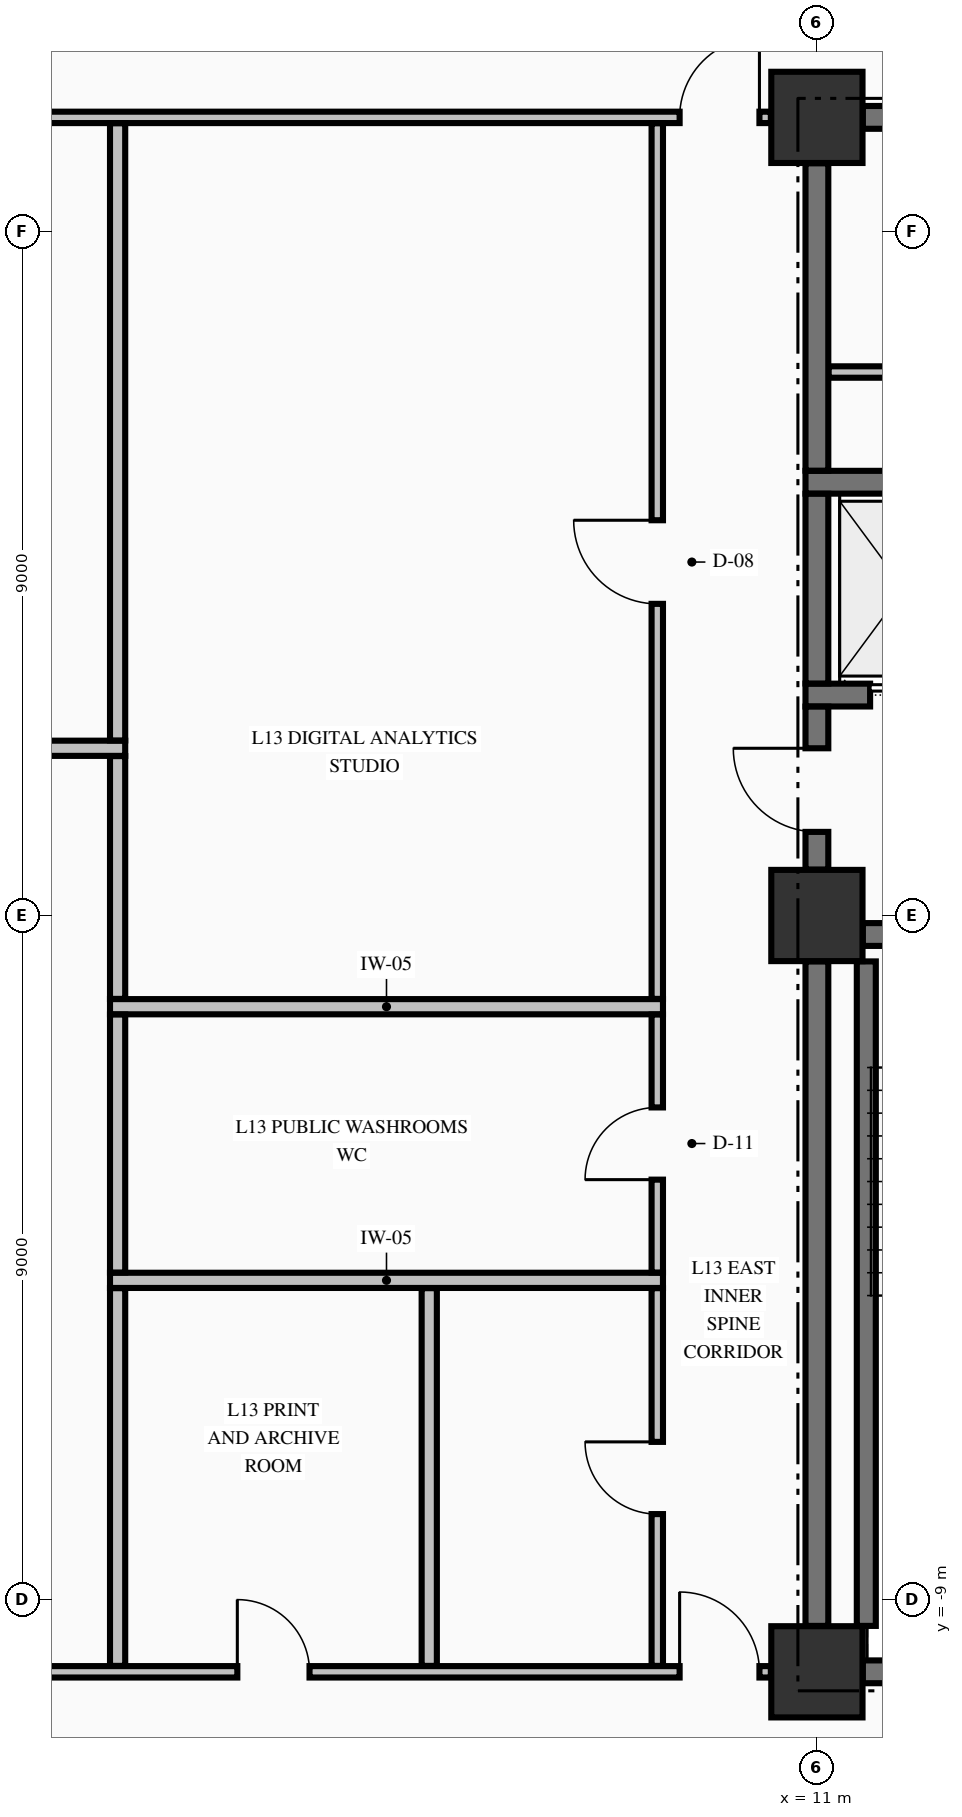
"""IFC4 building model, lengths in metres.
Left out: names, types, materials, properties, quantities, classifications, styles, units other than length and angle.
Written with IfcOpenShell. Run it as: python <this file> out.ifc"""

import sys

from ifc_helpers import new_model, si_unit, direction, frame, frame_2d, origin, origin_2d, place, context, subcontext, project, spatial, rectangle, extrude, element, fill, save


model = new_model("IFC4")
c1 = context("Model", 3, precision=1e-05, world=origin(), true_north=direction((0.0, 1.0)))
c2 = subcontext(c1, "Body", "Model", "MODEL_VIEW")
j1 = project(units=[si_unit("LENGTHUNIT", "METRE"), si_unit("PLANEANGLEUNIT", "RADIAN")], contexts=[c1])
p1 = place(None, origin())
s1 = spatial("IfcSite", under=j1, at=p1, CompositionType="ELEMENT")
p2 = place(p1, origin())
s2 = spatial("IfcBuilding", under=s1, at=p2, CompositionType="ELEMENT")
p3 = place(p2, frame((0.0, 0.0, 57.19)))
s3 = spatial("IfcBuildingStorey", under=s2, at=p3, CompositionType="ELEMENT", Elevation=57.19)
for number, where, z_axis, x_axis in (
    (1, (11.0, -9.95, -0.425), (0.0, 0.0, 1.0), (1.0, 0.0, 0.0)),
    (2, (11.0, 0.0, -0.425), (0.0, 0.0, 1.0), (1.0, 0.0, 0.0)),
    (3, (11.0, 10.5, -0.425), (0.0, 0.0, 1.0), (1.0, 0.0, 0.0)),
):
    element("IfcColumn", number, at=place(p3, frame(where, z_axis=z_axis, x_axis=x_axis)), inside=s3, PredefinedType="COLUMN", context=c2, shape_type="SweptSolid", body=[
        extrude(rectangle(XDim=1.2, YDim=1.2, at=origin_2d()), origin(), (0.0, 0.0, 1.0), 3.695),
    ])
p4 = place(p3, frame((11.604, -9.95, 0.0), z_axis=(0.0, 0.0, 1.0), x_axis=(1.0, 0.0, 0.0)))
e4 = element("IfcWall", 4, at=p4, inside=s3, PredefinedType="SHEAR", context=c2, shape_type="SweptSolid", body=[
    extrude(rectangle(XDim=3.096, YDim=0.3, at=frame_2d((1.548, 0.0))), origin(), (0.0, 0.0, 1.0), 3.27),
])
p5 = place(p3, frame((11.604, -0.25, 0.0), z_axis=(0.0, 0.0, 1.0), x_axis=(1.0, 0.0, 0.0)))
e5 = element("IfcWall", 5, at=p5, inside=s3, PredefinedType="SHEAR", context=c2, shape_type="SweptSolid", body=[
    extrude(rectangle(XDim=3.271, YDim=0.3, at=frame_2d((1.635, 0.0))), origin(), (0.0, 0.0, 1.0), 3.27),
])
p6 = place(p5, frame((0.996, 0.0, 0.0)))
e6 = element("IfcOpeningElement", 6, at=p6, cuts=e5, PredefinedType="OPENING", context=c2, shape_type="SweptSolid", body=[
    extrude(rectangle(XDim=1.1, YDim=2.15, at=frame_2d((0.55, 1.075))), frame((0.0, 0.16, 0.0), z_axis=(0.0, -1.0, 0.0), x_axis=(1.0, 0.0, 0.0)), (0.0, 0.0, 1.0), 0.32),
])
p7 = place(p3, frame((10.85, 2.9, 0.0), z_axis=(0.0, 0.0, 1.0), x_axis=(1.0, 0.0, 0.0)))
e7 = element("IfcWall", 7, at=p7, inside=s3, PredefinedType="SHEAR", context=c2, shape_type="SweptSolid", body=[
    extrude(rectangle(XDim=4.025, YDim=0.3, at=frame_2d((2.012, 0.0))), origin(), (0.0, 0.0, 1.0), 3.27),
])
p8 = place(p7, frame((0.85, 0.0, 0.0)))
e8 = element("IfcOpeningElement", 8, at=p8, cuts=e7, PredefinedType="OPENING", context=c2, shape_type="SweptSolid", body=[
    extrude(rectangle(XDim=1.1, YDim=2.2, at=frame_2d((0.55, 1.1))), frame((0.0, 0.16, 0.0), z_axis=(0.0, -1.0, 0.0), x_axis=(1.0, 0.0, 0.0)), (0.0, 0.0, 1.0), 0.32),
])
p9 = place(p3, frame((10.85, 5.7, 0.0), z_axis=(0.0, 0.0, 1.0), x_axis=(1.0, 0.0, 0.0)))
e9 = element("IfcWall", 9, at=p9, inside=s3, PredefinedType="SHEAR", context=c2, shape_type="SweptSolid", body=[
    extrude(rectangle(XDim=4.025, YDim=0.3, at=frame_2d((2.012, 0.0))), origin(), (0.0, 0.0, 1.0), 3.27),
])
p10 = place(p3, frame((11.604, 10.5, 0.0), z_axis=(0.0, 0.0, 1.0), x_axis=(1.0, 0.0, 0.0)))
e10 = element("IfcWall", 10, at=p10, inside=s3, PredefinedType="SHEAR", context=c2, shape_type="SweptSolid", body=[
    extrude(rectangle(XDim=3.096, YDim=0.3, at=frame_2d((1.548, 0.0))), origin(), (0.0, 0.0, 1.0), 3.27),
])
p11 = place(p10, frame((1.841, 0.0, 0.0)))
e11 = element("IfcOpeningElement", 11, at=p11, cuts=e10, PredefinedType="OPENING", context=c2, shape_type="SweptSolid", body=[
    extrude(rectangle(XDim=0.95, YDim=2.15, at=frame_2d((0.475, 1.075))), frame((0.0, 0.16, 0.0), z_axis=(0.0, -1.0, 0.0), x_axis=(1.0, 0.0, 0.0)), (0.0, 0.0, 1.0), 0.32),
])
p12 = place(p3, frame((-10.394, -9.95, 0.0), z_axis=(0.0, 0.0, 1.0), x_axis=(1.0, 0.0, 0.0)))
e12 = element("IfcWall", 12, at=p12, inside=s3, PredefinedType="PARTITIONING", context=c2, shape_type="SweptSolid", body=[
    extrude(rectangle(XDim=20.788, YDim=0.15, at=frame_2d((10.394, 0.0))), origin(), (0.0, 0.0, 1.0), 3.27),
])
p13 = place(p12, frame((0.15, 0.0, 0.0)))
e13 = element("IfcOpeningElement", 13, at=p13, cuts=e12, PredefinedType="OPENING", context=c2, shape_type="SweptSolid", body=[
    extrude(rectangle(XDim=1.05, YDim=2.15, at=frame_2d((0.525, 1.075))), frame((0.0, 0.085, 0.0), z_axis=(0.0, -1.0, 0.0), x_axis=(1.0, 0.0, 0.0)), (0.0, 0.0, 1.0), 0.17),
])
p14 = place(p12, frame((19.588, 0.0, 0.0)))
e14 = element("IfcOpeningElement", 14, at=p14, cuts=e12, PredefinedType="OPENING", context=c2, shape_type="SweptSolid", body=[
    extrude(rectangle(XDim=1.05, YDim=2.15, at=frame_2d((0.525, 1.075))), frame((0.0, 0.085, 0.0), z_axis=(0.0, -1.0, 0.0), x_axis=(1.0, 0.0, 0.0)), (0.0, 0.0, 1.0), 0.17),
])
p15 = place(p12, frame((13.769, 0.0, 0.0)))
e15 = element("IfcOpeningElement", 15, at=p15, cuts=e12, PredefinedType="OPENING", context=c2, shape_type="SweptSolid", body=[
    extrude(rectangle(XDim=0.95, YDim=2.15, at=frame_2d((0.475, 1.075))), frame((0.0, 0.085, 0.0), z_axis=(0.0, -1.0, 0.0), x_axis=(1.0, 0.0, 0.0)), (0.0, 0.0, 1.0), 0.17),
])
for number, where, z_axis, x_axis in (
    (16, (1.7, -4.8, 0.0), (0.0, 0.0, 1.0), (1.0, 0.0, 0.0)),
    (17, (1.7, -1.2, 0.0), (0.0, 0.0, 1.0), (1.0, 0.0, 0.0)),
):
    element("IfcWall", number, at=place(p3, frame(where, z_axis=z_axis, x_axis=x_axis)), inside=s3, PredefinedType="PARTITIONING", context=c2, shape_type="SweptSolid", body=[
        extrude(rectangle(XDim=7.275, YDim=0.2, at=frame_2d((3.638, 0.0))), origin(), (0.0, 0.0, 1.0), 3.27),
    ])
p16 = place(p3, frame((-8.975, 2.2, 0.0), z_axis=(0.0, 0.0, 1.0), x_axis=(1.0, 0.0, 0.0)))
e18 = element("IfcWall", 18, at=p16, inside=s3, PredefinedType="PARTITIONING", context=c2, shape_type="SweptSolid", body=[
    extrude(rectangle(XDim=10.875, YDim=0.2, at=frame_2d((5.438, 0.0))), origin(), (0.0, 0.0, 1.0), 3.27),
])
p17 = place(p3, frame((11.153, 7.15, 0.0), z_axis=(0.0, 0.0, 1.0), x_axis=(1.0, 0.0, 0.0)))
e19 = element("IfcWall", 19, at=p17, inside=s3, PredefinedType="PARTITIONING", context=c2, shape_type="SweptSolid", body=[
    extrude(rectangle(XDim=2.072, YDim=0.15, at=frame_2d((1.036, 0.0))), origin(), (0.0, 0.0, 1.0), 3.27),
])
p18 = place(p3, frame((-10.394, 10.5, 0.0), z_axis=(0.0, 0.0, 1.0), x_axis=(1.0, 0.0, 0.0)))
e20 = element("IfcWall", 20, at=p18, inside=s3, PredefinedType="PARTITIONING", context=c2, shape_type="SweptSolid", body=[
    extrude(rectangle(XDim=20.788, YDim=0.15, at=frame_2d((10.394, 0.0))), origin(), (0.0, 0.0, 1.0), 3.27),
])
p19 = place(p18, frame((0.15, 0.0, 0.0)))
e21 = element("IfcOpeningElement", 21, at=p19, cuts=e20, PredefinedType="OPENING", context=c2, shape_type="SweptSolid", body=[
    extrude(rectangle(XDim=1.05, YDim=2.15, at=frame_2d((0.525, 1.075))), frame((0.0, 0.085, 0.0), z_axis=(0.0, -1.0, 0.0), x_axis=(1.0, 0.0, 0.0)), (0.0, 0.0, 1.0), 0.17),
])
p20 = place(p18, frame((19.588, 0.0, 0.0)))
e22 = element("IfcOpeningElement", 22, at=p20, cuts=e20, PredefinedType="OPENING", context=c2, shape_type="SweptSolid", body=[
    extrude(rectangle(XDim=1.05, YDim=2.15, at=frame_2d((0.525, 1.075))), frame((0.0, 0.085, 0.0), z_axis=(0.0, -1.0, 0.0), x_axis=(1.0, 0.0, 0.0)), (0.0, 0.0, 1.0), 0.17),
])
p21 = place(p3, frame((11.0, -9.346, 0.0), z_axis=(0.0, 0.0, 1.0), x_axis=(0.0, 1.0, 0.0)))
e23 = element("IfcWall", 23, at=p21, inside=s3, PredefinedType="SHEAR", context=c2, shape_type="SweptSolid", body=[
    extrude(rectangle(XDim=8.742, YDim=0.3, at=frame_2d((4.371, 0.0))), origin(), (0.0, 0.0, 1.0), 3.27),
])
p22 = place(p3, frame((11.0, 0.604, 0.0), z_axis=(0.0, 0.0, 1.0), x_axis=(0.0, 1.0, 0.0)))
e24 = element("IfcWall", 24, at=p22, inside=s3, PredefinedType="SHEAR", context=c2, shape_type="SweptSolid", body=[
    extrude(rectangle(XDim=2.144, YDim=0.3, at=frame_2d((1.072, 0.0))), origin(), (0.0, 0.0, 1.0), 3.27),
])
p23 = place(p22, frame((0.496, 0.0, 0.0)))
e25 = element("IfcOpeningElement", 25, at=p23, cuts=e24, PredefinedType="OPENING", context=c2, shape_type="SweptSolid", body=[
    extrude(rectangle(XDim=1.1, YDim=2.15, at=frame_2d((0.55, 1.075))), frame((0.0, 0.16, 0.0), z_axis=(0.0, -1.0, 0.0), x_axis=(1.0, 0.0, 0.0)), (0.0, 0.0, 1.0), 0.32),
])
p24 = place(p3, frame((11.0, 3.052, 0.0), z_axis=(0.0, 0.0, 1.0), x_axis=(0.0, 1.0, 0.0)))
e26 = element("IfcWall", 26, at=p24, inside=s3, PredefinedType="SHEAR", context=c2, shape_type="SweptSolid", body=[
    extrude(rectangle(XDim=2.496, YDim=0.3, at=frame_2d((1.248, 0.0))), origin(), (0.0, 0.0, 1.0), 3.27),
])
p25 = place(p3, frame((11.0, 5.852, 0.0), z_axis=(0.0, 0.0, 1.0), x_axis=(0.0, 1.0, 0.0)))
e27 = element("IfcWall", 27, at=p25, inside=s3, PredefinedType="SHEAR", context=c2, shape_type="SweptSolid", body=[
    extrude(rectangle(XDim=4.044, YDim=0.3, at=frame_2d((2.022, 0.0))), origin(), (0.0, 0.0, 1.0), 3.27),
])
p26 = place(p3, frame((11.65, -9.346, 0.0), z_axis=(0.0, 0.0, 1.0), x_axis=(0.0, 1.0, 0.0)))
e28 = element("IfcWall", 28, at=p26, inside=s3, PredefinedType="SOLIDWALL", context=c2, shape_type="SweptSolid", body=[
    extrude(rectangle(XDim=8.742, YDim=0.25, at=frame_2d((4.371, 0.0))), origin(), (0.0, 0.0, 1.0), 3.27),
])
p27 = place(p3, frame((1.8, -9.872, 0.0), z_axis=(0.0, 0.0, 1.0), x_axis=(0.0, 1.0, 0.0)))
e29 = element("IfcWall", 29, at=p27, inside=s3, PredefinedType="PARTITIONING", context=c2, shape_type="SweptSolid", body=[
    extrude(rectangle(XDim=4.969, YDim=0.2, at=frame_2d((2.484, 0.0))), origin(), (0.0, 0.0, 1.0), 3.27),
])
p28 = place(p3, frame((1.8, -4.697, 0.0), z_axis=(0.0, 0.0, 1.0), x_axis=(0.0, 1.0, 0.0)))
e30 = element("IfcWall", 30, at=p28, inside=s3, PredefinedType="PARTITIONING", context=c2, shape_type="SweptSolid", body=[
    extrude(rectangle(XDim=3.394, YDim=0.2, at=frame_2d((1.697, 0.0))), origin(), (0.0, 0.0, 1.0), 3.27),
])
p29 = place(p3, frame((1.8, -1.097, 0.0), z_axis=(0.0, 0.0, 1.0), x_axis=(0.0, 1.0, 0.0)))
e31 = element("IfcWall", 31, at=p29, inside=s3, PredefinedType="PARTITIONING", context=c2, shape_type="SweptSolid", body=[
    extrude(rectangle(XDim=3.194, YDim=0.2, at=frame_2d((1.597, 0.0))), origin(), (0.0, 0.0, 1.0), 3.27),
])
p30 = place(p3, frame((1.8, 2.303, 0.0), z_axis=(0.0, 0.0, 1.0), x_axis=(0.0, 1.0, 0.0)))
e32 = element("IfcWall", 32, at=p30, inside=s3, PredefinedType="PARTITIONING", context=c2, shape_type="SweptSolid", body=[
    extrude(rectangle(XDim=8.119, YDim=0.2, at=frame_2d((4.06, 0.0))), origin(), (0.0, 0.0, 1.0), 3.27),
])
p31 = place(p3, frame((5.9, -9.872, 0.0), z_axis=(0.0, 0.0, 1.0), x_axis=(0.0, 1.0, 0.0)))
e33 = element("IfcWall", 33, at=p31, inside=s3, PredefinedType="PARTITIONING", context=c2, shape_type="SweptSolid", body=[
    extrude(rectangle(XDim=4.969, YDim=0.2, at=frame_2d((2.484, 0.0))), origin(), (0.0, 0.0, 1.0), 3.27),
])
p32 = place(p3, frame((8.9, -9.872, 0.0), z_axis=(0.0, 0.0, 1.0), x_axis=(0.0, 1.0, 0.0)))
e34 = element("IfcWall", 34, at=p32, inside=s3, PredefinedType="PARTITIONING", context=c2, shape_type="SweptSolid", body=[
    extrude(rectangle(XDim=4.969, YDim=0.15, at=frame_2d((2.484, 0.0))), origin(), (0.0, 0.0, 1.0), 3.27),
])
p33 = place(p32, frame((1.997, 0.0, 0.0)))
e35 = element("IfcOpeningElement", 35, at=p33, cuts=e34, PredefinedType="OPENING", context=c2, shape_type="SweptSolid", body=[
    extrude(rectangle(XDim=0.95, YDim=2.15, at=frame_2d((0.475, 1.075))), frame((0.0, 0.085, 0.0), z_axis=(0.0, -1.0, 0.0), x_axis=(1.0, 0.0, 0.0)), (0.0, 0.0, 1.0), 0.17),
])
p34 = place(p3, frame((8.9, -4.697, 0.0), z_axis=(0.0, 0.0, 1.0), x_axis=(0.0, 1.0, 0.0)))
e36 = element("IfcWall", 36, at=p34, inside=s3, PredefinedType="PARTITIONING", context=c2, shape_type="SweptSolid", body=[
    extrude(rectangle(XDim=3.394, YDim=0.15, at=frame_2d((1.697, 0.0))), origin(), (0.0, 0.0, 1.0), 3.27),
])
p35 = place(p34, frame((1.222, 0.0, 0.0)))
e37 = element("IfcOpeningElement", 37, at=p35, cuts=e36, PredefinedType="OPENING", context=c2, shape_type="SweptSolid", body=[
    extrude(rectangle(XDim=0.95, YDim=2.15, at=frame_2d((0.475, 1.075))), frame((0.0, 0.085, 0.0), z_axis=(0.0, -1.0, 0.0), x_axis=(1.0, 0.0, 0.0)), (0.0, 0.0, 1.0), 0.17),
])
p36 = place(p3, frame((8.9, -1.097, 0.0), z_axis=(0.0, 0.0, 1.0), x_axis=(0.0, 1.0, 0.0)))
e38 = element("IfcWall", 38, at=p36, inside=s3, PredefinedType="PARTITIONING", context=c2, shape_type="SweptSolid", body=[
    extrude(rectangle(XDim=11.519, YDim=0.15, at=frame_2d((5.76, 0.0))), origin(), (0.0, 0.0, 1.0), 3.27),
])
p37 = place(p36, frame((5.197, 0.0, 0.0)))
e39 = element("IfcOpeningElement", 39, at=p37, cuts=e38, PredefinedType="OPENING", context=c2, shape_type="SweptSolid", body=[
    extrude(rectangle(XDim=1.1, YDim=2.15, at=frame_2d((0.55, 1.075))), frame((0.0, 0.085, 0.0), z_axis=(0.0, -1.0, 0.0), x_axis=(1.0, 0.0, 0.0)), (0.0, 0.0, 1.0), 0.17),
])
p38 = place(p23, origin())
e40 = element("IfcDoor", 40, at=p38, inside=s3, OperationType="SINGLE_SWING_RIGHT", PredefinedType="DOOR", context=c2, shape_type="SweptSolid", body=[
    extrude(rectangle(XDim=1.1, YDim=2.15, at=frame_2d((0.55, 1.075))), frame((0.0, 0.025, 0.0), z_axis=(0.0, -1.0, 0.0), x_axis=(1.0, 0.0, 0.0)), (0.0, 0.0, 1.0), 0.05),
])
fill(e25, e40)
p39 = place(p8, origin())
e41 = element("IfcDoor", 41, at=p39, inside=s3, OperationType="SLIDING_TO_RIGHT", PredefinedType="DOOR", context=c2, shape_type="SweptSolid", body=[
    extrude(rectangle(XDim=1.1, YDim=2.2, at=frame_2d((0.55, 1.1))), frame((0.0, 0.025, 0.0), z_axis=(0.0, -1.0, 0.0), x_axis=(1.0, 0.0, 0.0)), (0.0, 0.0, 1.0), 0.05),
])
fill(e8, e41)
p40 = place(p20, origin())
e42 = element("IfcDoor", 42, at=p40, inside=s3, OperationType="SINGLE_SWING_RIGHT", PredefinedType="DOOR", context=c2, shape_type="SweptSolid", body=[
    extrude(rectangle(XDim=1.05, YDim=2.15, at=frame_2d((0.525, 1.075))), frame((0.0, 0.025, 0.0), z_axis=(0.0, -1.0, 0.0), x_axis=(1.0, 0.0, 0.0)), (0.0, 0.0, 1.0), 0.05),
])
fill(e22, e42)
p41 = place(p14, origin())
e43 = element("IfcDoor", 43, at=p41, inside=s3, OperationType="SINGLE_SWING_LEFT", PredefinedType="DOOR", context=c2, shape_type="SweptSolid", body=[
    extrude(rectangle(XDim=1.05, YDim=2.15, at=frame_2d((0.525, 1.075))), frame((0.0, 0.025, 0.0), z_axis=(0.0, -1.0, 0.0), x_axis=(1.0, 0.0, 0.0)), (0.0, 0.0, 1.0), 0.05),
])
fill(e14, e43)
p42 = place(p37, origin())
e44 = element("IfcDoor", 44, at=p42, inside=s3, OperationType="SINGLE_SWING_RIGHT", PredefinedType="DOOR", context=c2, shape_type="SweptSolid", body=[
    extrude(rectangle(XDim=1.1, YDim=2.15, at=frame_2d((0.55, 1.075))), frame((0.0, 0.025, 0.0), z_axis=(0.0, -1.0, 0.0), x_axis=(1.0, 0.0, 0.0)), (0.0, 0.0, 1.0), 0.05),
])
fill(e39, e44)
p43 = place(p35, origin())
e45 = element("IfcDoor", 45, at=p43, inside=s3, OperationType="SINGLE_SWING_LEFT", PredefinedType="DOOR", context=c2, shape_type="SweptSolid", body=[
    extrude(rectangle(XDim=0.95, YDim=2.15, at=frame_2d((0.475, 1.075))), frame((0.0, 0.025, 0.0), z_axis=(0.0, -1.0, 0.0), x_axis=(1.0, 0.0, 0.0)), (0.0, 0.0, 1.0), 0.05),
])
fill(e37, e45)
p44 = place(p33, origin())
e46 = element("IfcDoor", 46, at=p44, inside=s3, OperationType="SINGLE_SWING_RIGHT", PredefinedType="DOOR", context=c2, shape_type="SweptSolid", body=[
    extrude(rectangle(XDim=0.95, YDim=2.15, at=frame_2d((0.475, 1.075))), frame((0.0, 0.025, 0.0), z_axis=(0.0, -1.0, 0.0), x_axis=(1.0, 0.0, 0.0)), (0.0, 0.0, 1.0), 0.05),
])
fill(e35, e46)
p45 = place(p15, origin())
e47 = element("IfcDoor", 47, at=p45, inside=s3, OperationType="SINGLE_SWING_LEFT", PredefinedType="DOOR", context=c2, shape_type="SweptSolid", body=[
    extrude(rectangle(XDim=0.95, YDim=2.15, at=frame_2d((0.475, 1.075))), frame((0.0, 0.025, 0.0), z_axis=(0.0, -1.0, 0.0), x_axis=(1.0, 0.0, 0.0)), (0.0, 0.0, 1.0), 0.05),
])
fill(e15, e47)
save(model, sys.argv[1])
